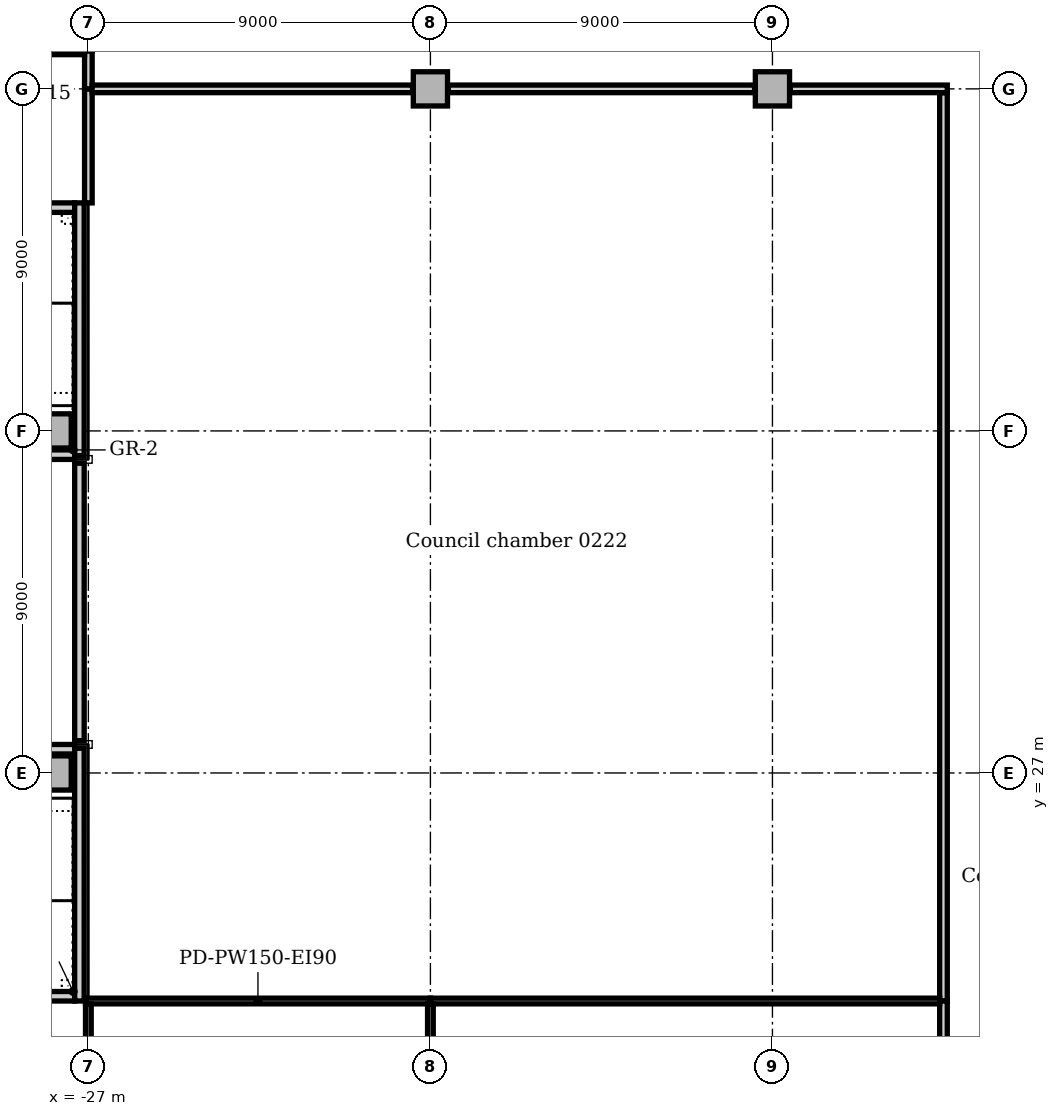
"""IFC4 building model, lengths in metres.
Left out: names, types, materials, properties, quantities, classifications, styles, units other than length and angle.
Written with IfcOpenShell. Run it as: python <this file> out.ifc"""

import sys

from ifc_helpers import new_model, si_unit, direction, frame, frame_2d, origin, origin_2d, place, context, subcontext, project, spatial, rectangle, extrude, element, save


model = new_model("IFC4")
c1 = context("Model", 3, precision=1e-05, world=origin(), true_north=direction((0.0, 1.0)))
c2 = subcontext(c1, "Body", "Model", "MODEL_VIEW")
j1 = project(units=[si_unit("LENGTHUNIT", "METRE"), si_unit("PLANEANGLEUNIT", "RADIAN")], contexts=[c1])
p1 = place(None, origin())
s1 = spatial("IfcSite", under=j1, at=p1, CompositionType="ELEMENT")
p2 = place(p1, origin())
s2 = spatial("IfcBuilding", under=s1, at=p2, CompositionType="ELEMENT")
p3 = place(p2, frame((0.0, 0.0, 11.0)))
s3 = spatial("IfcBuildingStorey", under=s2, at=p3, CompositionType="ELEMENT", Elevation=11.0)
p4 = place(p3, frame((-30.9, 21.125, 0.0), z_axis=(0.0, 0.0, 1.0), x_axis=(1.0, 0.0, 0.0)))
e1 = element("IfcWall", 1, at=p4, inside=s3, PredefinedType="SOLIDWALL", context=c2, shape_type="SweptSolid", body=[
    extrude(rectangle(XDim=3.54, YDim=0.25, at=frame_2d((1.77, 0.0))), origin(), (0.0, 0.0, 1.0), 5.0),
])
p5 = place(p3, frame((-27.36, 27.625, 0.0), z_axis=(0.0, 0.0, 1.0), x_axis=(-1.0, 0.0, 0.0)))
e2 = element("IfcWall", 2, at=p5, inside=s3, PredefinedType="SOLIDWALL", context=c2, shape_type="SweptSolid", body=[
    extrude(rectangle(XDim=3.54, YDim=0.25, at=frame_2d((1.77, 0.0))), origin(), (0.0, 0.0, 1.0), 5.0),
])
p6 = place(p5, frame((1.69, 0.0, 0.0)))
e3 = element("IfcOpeningElement", 3, at=p6, cuts=e2, PredefinedType="OPENING", context=c2, shape_type="SweptSolid", body=[
    extrude(rectangle(XDim=1.1, YDim=2.1, at=frame_2d((0.55, 1.05))), frame((0.0, 0.135, 0.0), z_axis=(0.0, -1.0, 0.0), x_axis=(1.0, 0.0, 0.0)), (0.0, 0.0, 1.0), 0.27),
])
p7 = place(p3, frame((-30.9, 35.375, 0.0), z_axis=(0.0, 0.0, 1.0), x_axis=(1.0, 0.0, 0.0)))
e4 = element("IfcWall", 4, at=p7, inside=s3, PredefinedType="SOLIDWALL", context=c2, shape_type="SweptSolid", body=[
    extrude(rectangle(XDim=3.54, YDim=0.25, at=frame_2d((1.77, 0.0))), origin(), (0.0, 0.0, 1.0), 5.0),
])
p8 = place(p7, frame((0.75, 0.0, 0.0)))
e5 = element("IfcOpeningElement", 5, at=p8, cuts=e4, PredefinedType="OPENING", context=c2, shape_type="SweptSolid", body=[
    extrude(rectangle(XDim=1.1, YDim=2.1, at=frame_2d((0.55, 1.05))), frame((0.0, 0.135, 0.0), z_axis=(0.0, -1.0, 0.0), x_axis=(1.0, 0.0, 0.0)), (0.0, 0.0, 1.0), 0.27),
])
p9 = place(p3, frame((-27.36, 41.875, 0.0), z_axis=(0.0, 0.0, 1.0), x_axis=(-1.0, 0.0, 0.0)))
e6 = element("IfcWall", 6, at=p9, inside=s3, PredefinedType="SOLIDWALL", context=c2, shape_type="SweptSolid", body=[
    extrude(rectangle(XDim=3.54, YDim=0.25, at=frame_2d((1.77, 0.0))), origin(), (0.0, 0.0, 1.0), 5.0),
])
p10 = place(p3, frame((-27.235, 21.0, 0.0), z_axis=(0.0, 0.0, 1.0), x_axis=(0.0, 1.0, 0.0)))
e7 = element("IfcWall", 7, at=p10, inside=s3, PredefinedType="SOLIDWALL", context=c2, shape_type="SweptSolid", body=[
    extrude(rectangle(XDim=6.65, YDim=0.25, at=frame_2d((3.325, 0.0))), origin(), (0.0, 0.0, 1.0), 5.0),
])
p11 = place(p3, frame((-27.235, 27.85, 0.0), z_axis=(0.0, 0.0, 1.0), x_axis=(0.0, 1.0, 0.0)))
e8 = element("IfcWall", 8, at=p11, inside=s3, PredefinedType="SOLIDWALL", context=c2, shape_type="SweptSolid", body=[
    extrude(rectangle(XDim=7.3, YDim=0.25, at=frame_2d((3.65, 0.0))), origin(), (0.0, 0.0, 1.0), 5.0),
])
p12 = place(p3, frame((-27.235, 35.35, 0.0), z_axis=(0.0, 0.0, 1.0), x_axis=(0.0, 1.0, 0.0)))
e9 = element("IfcWall", 9, at=p12, inside=s3, PredefinedType="SOLIDWALL", context=c2, shape_type="SweptSolid", body=[
    extrude(rectangle(XDim=6.65, YDim=0.25, at=frame_2d((3.325, 0.0))), origin(), (0.0, 0.0, 1.0), 5.0),
])
for number, where, z_axis, x_axis in (
    (10, (-27.9, 27.0, 0.0), (0.0, 0.0, 1.0), (1.0, 0.0, 0.0)),
    (11, (-27.9, 36.0, 0.0), (0.0, 0.0, 1.0), (1.0, 0.0, 0.0)),
):
    element("IfcColumn", number, at=place(p3, frame(where, z_axis=z_axis, x_axis=x_axis)), inside=s3, PredefinedType="COLUMN", context=c2, shape_type="SweptSolid", body=[
        extrude(rectangle(XDim=0.9, YDim=0.9, at=origin_2d()), origin(), (0.0, 0.0, 1.0), 5.0),
    ])
for number, where, z_axis, x_axis in (
    (12, (-18.0, 45.0, 0.0), (0.0, 0.0, 1.0), (1.0, 0.0, 0.0)),
    (13, (-9.0, 45.0, 0.0), (0.0, 0.0, 1.0), (1.0, 0.0, 0.0)),
):
    element("IfcColumn", number, at=place(p3, frame(where, z_axis=z_axis, x_axis=x_axis)), inside=s3, PredefinedType="COLUMN", context=c2, shape_type="SweptSolid", body=[
        extrude(rectangle(XDim=0.9, YDim=0.9, at=origin_2d()), origin(), (0.0, 0.0, 1.0), 4.7),
    ])
p13 = place(p3, frame((-27.0, 42.0, 0.0), z_axis=(0.0, 0.0, 1.0), x_axis=(0.0, 1.0, 0.0)))
e14 = element("IfcWall", 14, at=p13, inside=s3, PredefinedType="PARTITIONING", context=c2, shape_type="SweptSolid", body=[
    extrude(rectangle(XDim=3.0, YDim=0.2, at=frame_2d((1.5, 0.0))), origin(), (0.0, 0.0, 1.0), 4.7),
])
p14 = place(p3, frame((-27.0, 45.0, 0.0), z_axis=(0.0, 0.0, 1.0), x_axis=(0.0, 1.0, 0.0)))
e15 = element("IfcWall", 15, at=p14, inside=s3, PredefinedType="PARTITIONING", context=c2, shape_type="SweptSolid", body=[
    extrude(rectangle(XDim=1.0, YDim=0.2, at=frame_2d((0.5, 0.0))), origin(), (0.0, 0.0, 1.0), 4.7),
])
p15 = place(p3, frame((-36.0, 46.0, 0.0), z_axis=(0.0, 0.0, 1.0), x_axis=(1.0, 0.0, 0.0)))
e16 = element("IfcWall", 16, at=p15, inside=s3, PredefinedType="PARTITIONING", context=c2, shape_type="SweptSolid", body=[
    extrude(rectangle(XDim=8.9, YDim=0.2, at=frame_2d((4.45, 0.0))), origin(), (0.0, 0.0, 1.0), 4.7),
])
p16 = place(p15, frame((4.0, 0.0, 0.0)))
e17 = element("IfcOpeningElement", 17, at=p16, cuts=e16, PredefinedType="OPENING", context=c2, shape_type="SweptSolid", body=[
    extrude(rectangle(XDim=1.0, YDim=2.1, at=frame_2d((0.5, 1.05))), frame((0.0, 0.11, 0.0), z_axis=(0.0, -1.0, 0.0), x_axis=(1.0, 0.0, 0.0)), (0.0, 0.0, 1.0), 0.22),
])
p17 = place(p3, frame((-4.5, 21.0, 0.0), z_axis=(0.0, 0.0, 1.0), x_axis=(0.0, 1.0, 0.0)))
e18 = element("IfcWall", 18, at=p17, inside=s3, PredefinedType="PARTITIONING", context=c2, shape_type="SweptSolid", body=[
    extrude(rectangle(XDim=23.9, YDim=0.2, at=frame_2d((11.95, 0.0))), origin(), (0.0, 0.0, 1.0), 4.7),
])
p18 = place(p3, frame((-4.5, 3.7, 0.0), z_axis=(0.0, 0.0, 1.0), x_axis=(0.0, 1.0, 0.0)))
e19 = element("IfcWall", 19, at=p18, inside=s3, PredefinedType="PARTITIONING", context=c2, shape_type="SweptSolid", body=[
    extrude(rectangle(XDim=17.3, YDim=0.2, at=frame_2d((8.65, 0.0))), origin(), (0.0, 0.0, 1.0), 4.7),
])
p19 = place(p18, frame((7.7, 0.0, 0.0)))
e20 = element("IfcOpeningElement", 20, at=p19, cuts=e19, PredefinedType="OPENING", context=c2, shape_type="SweptSolid", body=[
    extrude(rectangle(XDim=1.8, YDim=2.1, at=frame_2d((0.9, 1.05))), frame((0.0, 0.11, 0.0), z_axis=(0.0, -1.0, 0.0), x_axis=(1.0, 0.0, 0.0)), (0.0, 0.0, 1.0), 0.22),
])
p20 = place(p3, frame((-27.075, 21.0, 0.0), z_axis=(0.0, 0.0, 1.0), x_axis=(1.0, 0.0, 0.0)))
e21 = element("IfcWall", 21, at=p20, inside=s3, PredefinedType="PARTITIONING", context=c2, shape_type="SweptSolid", body=[
    extrude(rectangle(XDim=9.075, YDim=0.15, at=frame_2d((4.537, 0.0))), origin(), (0.0, 0.0, 1.0), 4.7),
])
p21 = place(p3, frame((-18.0, 21.0, 0.0), z_axis=(0.0, 0.0, 1.0), x_axis=(1.0, 0.0, 0.0)))
e22 = element("IfcWall", 22, at=p21, inside=s3, PredefinedType="PARTITIONING", context=c2, shape_type="SweptSolid", body=[
    extrude(rectangle(XDim=13.4, YDim=0.15, at=frame_2d((6.7, 0.0))), origin(), (0.0, 0.0, 1.0), 4.7),
])
p22 = place(p3, frame((-26.9, 45.0, 0.0), z_axis=(0.0, 0.0, 1.0), x_axis=(1.0, 0.0, 0.0)))
e23 = element("IfcWall", 23, at=p22, inside=s3, PredefinedType="PARTITIONING", context=c2, shape_type="SweptSolid", body=[
    extrude(rectangle(XDim=8.43, YDim=0.2, at=frame_2d((4.215, 0.0))), origin(), (0.0, 0.0, 1.0), 4.7),
])
p23 = place(p3, frame((-17.53, 45.0, 0.0), z_axis=(0.0, 0.0, 1.0), x_axis=(1.0, 0.0, 0.0)))
e24 = element("IfcWall", 24, at=p23, inside=s3, PredefinedType="PARTITIONING", context=c2, shape_type="SweptSolid", body=[
    extrude(rectangle(XDim=8.06, YDim=0.2, at=frame_2d((4.03, 0.0))), origin(), (0.0, 0.0, 1.0), 4.7),
])
p24 = place(p3, frame((-8.53, 45.0, 0.0), z_axis=(0.0, 0.0, 1.0), x_axis=(1.0, 0.0, 0.0)))
e25 = element("IfcWall", 25, at=p24, inside=s3, PredefinedType="PARTITIONING", context=c2, shape_type="SweptSolid", body=[
    extrude(rectangle(XDim=4.13, YDim=0.2, at=frame_2d((2.065, 0.0))), origin(), (0.0, 0.0, 1.0), 4.7),
])
p25 = place(p3, frame((-18.0, 18.47, 0.0), z_axis=(0.0, 0.0, 1.0), x_axis=(0.0, 1.0, 0.0)))
e26 = element("IfcWall", 26, at=p25, inside=s3, PredefinedType="PARTITIONING", context=c2, shape_type="SweptSolid", body=[
    extrude(rectangle(XDim=2.455, YDim=0.15, at=frame_2d((1.228, 0.0))), origin(), (0.0, 0.0, 1.0), 4.7),
])
p26 = place(p3, frame((-27.0, 3.7, 0.0), z_axis=(0.0, 0.0, 1.0), x_axis=(0.0, 1.0, 0.0)))
e27 = element("IfcWall", 27, at=p26, inside=s3, PredefinedType="PARTITIONING", context=c2, shape_type="SweptSolid", body=[
    extrude(rectangle(XDim=17.225, YDim=0.15, at=frame_2d((8.613, 0.0))), origin(), (0.0, 0.0, 1.0), 4.7),
])
for number, where, z_axis, x_axis in (
    (28, (-27.36, 27.75, 0.0), (0.0, 0.0, 1.0), (1.0, 0.0, 0.0)),
    (29, (-26.9, 35.25, 0.0), (0.0, 0.0, 1.0), (-1.0, 0.0, 0.0)),
):
    element("IfcWall", number, at=place(p3, frame(where, z_axis=z_axis, x_axis=x_axis)), inside=s3, PredefinedType="SOLIDWALL", context=c2, shape_type="SweptSolid", body=[
        extrude(rectangle(XDim=0.46, YDim=0.2, at=frame_2d((0.23, 0.0))), origin(), (0.0, 0.0, 1.0), 5.0),
    ])
save(model, sys.argv[1])
